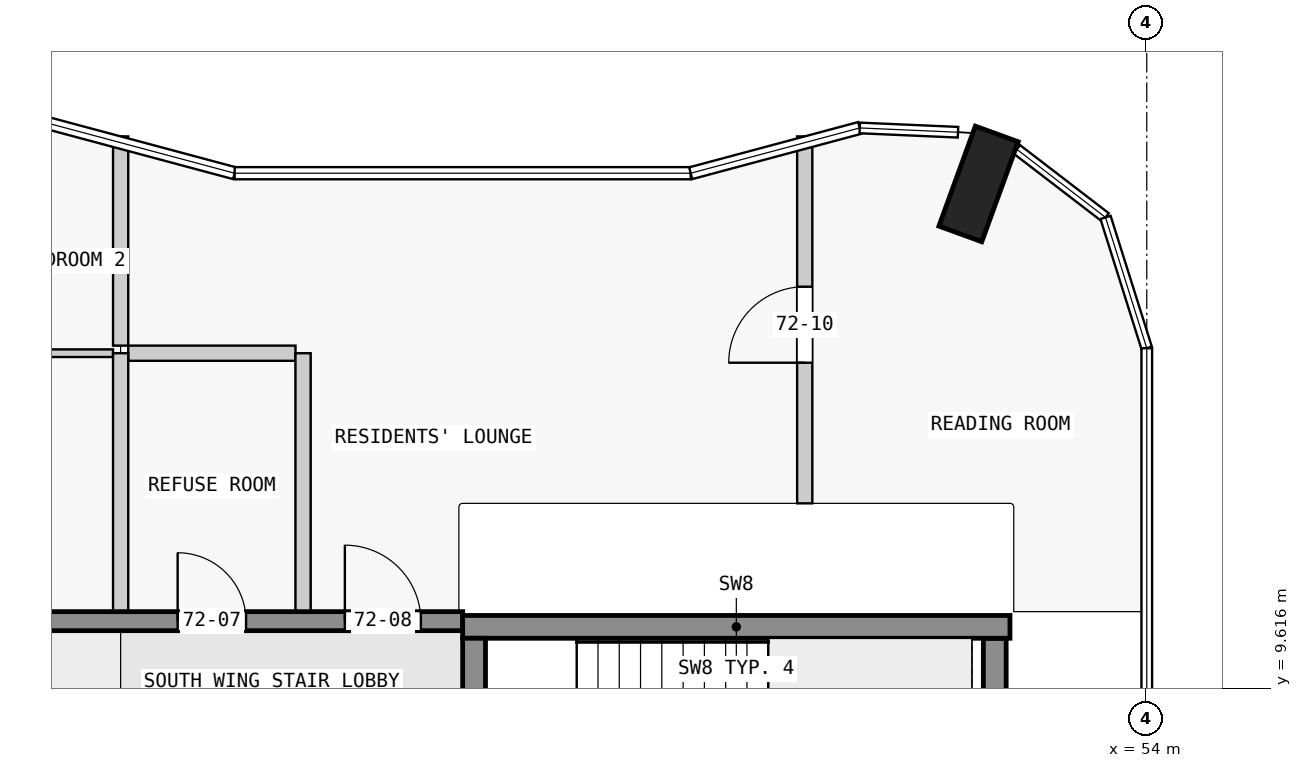
"""IFC4 building model, lengths in metres.
Left out: names, types, materials, properties, quantities, classifications, styles, units other than length and angle.
Written with IfcOpenShell. Run it as: python <this file> out.ifc"""

import sys

from ifc_helpers import new_model, si_unit, direction, frame, frame_2d, origin, origin_2d, place, context, subcontext, project, spatial, rectangle, extrude, element, fill, save


model = new_model("IFC4")
c1 = context("Model", 3, precision=1e-05, world=origin(), true_north=direction((0.0, 1.0)))
c2 = subcontext(c1, "Body", "Model", "MODEL_VIEW")
j1 = project(units=[si_unit("LENGTHUNIT", "METRE"), si_unit("PLANEANGLEUNIT", "RADIAN")], contexts=[c1])
p1 = place(None, origin())
s1 = spatial("IfcSite", under=j1, at=p1, CompositionType="ELEMENT")
p2 = place(p1, origin())
s2 = spatial("IfcBuilding", under=s1, at=p2, CompositionType="ELEMENT")
p3 = place(p2, frame((0.0, 0.0, 273.9)))
s3 = spatial("IfcBuildingStorey", under=s2, at=p3, CompositionType="ELEMENT", Elevation=273.9)
p4 = place(p3, frame((51.787, 16.252, 0.0), z_axis=(0.0, 0.0, 1.0), x_axis=(-0.939664280925, 0.342097996418, 0.0)))
e1 = element("IfcColumn", 1, at=p4, inside=s3, PredefinedType="COLUMN", context=c2, shape_type="SweptSolid", body=[
    extrude(rectangle(XDim=0.6, YDim=1.4, at=origin_2d()), origin(), (0.0, 0.0, 1.0), 3.5),
])
p5 = place(p3, frame((45.15, 7.725, 0.0), z_axis=(0.0, 0.0, 1.0), x_axis=(0.0, 1.0, 0.0)))
e2 = element("IfcWall", 2, at=p5, inside=s3, PredefinedType="SHEAR", context=c2, shape_type="SweptSolid", body=[
    extrude(rectangle(XDim=2.55, YDim=0.3, at=frame_2d((1.275, 0.0))), origin(), (0.0, 0.0, 1.0), 3.5),
])
p6 = place(p5, frame((0.725, 0.0, 0.0)))
e3 = element("IfcOpeningElement", 3, at=p6, cuts=e2, PredefinedType="OPENING", context=c2, shape_type="SweptSolid", body=[
    extrude(rectangle(XDim=1.1, YDim=2.1, at=frame_2d((0.55, 1.05))), frame((0.0, 0.16, 0.0), z_axis=(0.0, -1.0, 0.0), x_axis=(1.0, 0.0, 0.0)), (0.0, 0.0, 1.0), 0.32),
])
p7 = place(p3, frame((52.0, 7.725, 0.0), z_axis=(0.0, 0.0, 1.0), x_axis=(0.0, 1.0, 0.0)))
e4 = element("IfcWall", 4, at=p7, inside=s3, PredefinedType="SHEAR", context=c2, shape_type="SweptSolid", body=[
    extrude(rectangle(XDim=2.55, YDim=0.3, at=frame_2d((1.275, 0.0))), origin(), (0.0, 0.0, 1.0), 3.5),
])
p8 = place(p3, frame((45.0, 10.425, 0.0), z_axis=(0.0, 0.0, 1.0), x_axis=(1.0, 0.0, 0.0)))
e5 = element("IfcWall", 5, at=p8, inside=s3, PredefinedType="SHEAR", context=c2, shape_type="SweptSolid", body=[
    extrude(rectangle(XDim=7.2, YDim=0.3, at=frame_2d((3.6, 0.0))), origin(), (0.0, 0.0, 1.0), 3.5),
])
p9 = place(p3, frame((22.5, 10.5, 0.0), z_axis=(0.0, 0.0, 1.0), x_axis=(1.0, 0.0, 0.0)))
e6 = element("IfcWall", 6, at=p9, inside=s3, PredefinedType="SHEAR", context=c2, shape_type="SweptSolid", body=[
    extrude(rectangle(XDim=22.5, YDim=0.25, at=frame_2d((11.25, 0.0))), origin(), (0.0, 0.0, 1.0), 3.25),
])
p10 = place(p9, frame((1.85, 0.0, 0.0)))
e7 = element("IfcOpeningElement", 7, at=p10, cuts=e6, PredefinedType="OPENING", context=c2, shape_type="SweptSolid", body=[
    extrude(rectangle(XDim=0.9, YDim=2.1, at=frame_2d((0.45, 1.05))), frame((0.0, 0.135, 0.0), z_axis=(0.0, -1.0, 0.0), x_axis=(1.0, 0.0, 0.0)), (0.0, 0.0, 1.0), 0.27),
])
p11 = place(p9, frame((10.05, 0.0, 0.0)))
e8 = element("IfcOpeningElement", 8, at=p11, cuts=e6, PredefinedType="OPENING", context=c2, shape_type="SweptSolid", body=[
    extrude(rectangle(XDim=1.0, YDim=2.1, at=frame_2d((0.5, 1.05))), frame((0.0, 0.135, 0.0), z_axis=(0.0, -1.0, 0.0), x_axis=(1.0, 0.0, 0.0)), (0.0, 0.0, 1.0), 0.27),
])
p12 = place(p9, frame((18.75, 0.0, 0.0)))
e9 = element("IfcOpeningElement", 9, at=p12, cuts=e6, PredefinedType="OPENING", context=c2, shape_type="SweptSolid", body=[
    extrude(rectangle(XDim=0.9, YDim=2.1, at=frame_2d((0.45, 1.05))), frame((0.0, 0.135, 0.0), z_axis=(0.0, -1.0, 0.0), x_axis=(1.0, 0.0, 0.0)), (0.0, 0.0, 1.0), 0.27),
])
p13 = place(p9, frame((20.95, 0.0, 0.0)))
e10 = element("IfcOpeningElement", 10, at=p13, cuts=e6, PredefinedType="OPENING", context=c2, shape_type="SweptSolid", body=[
    extrude(rectangle(XDim=1.0, YDim=2.1, at=frame_2d((0.5, 1.05))), frame((0.0, 0.135, 0.0), z_axis=(0.0, -1.0, 0.0), x_axis=(1.0, 0.0, 0.0)), (0.0, 0.0, 1.0), 0.27),
])
p14 = place(p3, frame((31.5, 14.025, 0.0), z_axis=(0.0, 0.0, 1.0), x_axis=(1.0, 0.0, 0.0)))
e11 = element("IfcWall", 11, at=p14, inside=s3, PredefinedType="PARTITIONING", context=c2, shape_type="SweptSolid", body=[
    extrude(rectangle(XDim=8.9, YDim=0.1, at=frame_2d((4.45, 0.0))), origin(), (0.0, 0.0, 1.0), 3.25),
])
p15 = place(p14, frame((1.85, 0.0, 0.0)))
e12 = element("IfcOpeningElement", 12, at=p15, cuts=e11, PredefinedType="OPENING", context=c2, shape_type="SweptSolid", body=[
    extrude(rectangle(XDim=0.9, YDim=2.1, at=frame_2d((0.45, 1.05))), frame((0.0, 0.06, 0.0), z_axis=(0.0, -1.0, 0.0), x_axis=(1.0, 0.0, 0.0)), (0.0, 0.0, 1.0), 0.12),
])
p16 = place(p14, frame((6.25, 0.0, 0.0)))
e13 = element("IfcOpeningElement", 13, at=p16, cuts=e11, PredefinedType="OPENING", context=c2, shape_type="SweptSolid", body=[
    extrude(rectangle(XDim=0.9, YDim=2.1, at=frame_2d((0.45, 1.05))), frame((0.0, 0.06, 0.0), z_axis=(0.0, -1.0, 0.0), x_axis=(1.0, 0.0, 0.0)), (0.0, 0.0, 1.0), 0.12),
])
p17 = place(p3, frame((42.8, 14.025, 0.0), z_axis=(0.0, 0.0, 1.0), x_axis=(-1.0, 0.0, 0.0)))
e14 = element("IfcWall", 14, at=p17, inside=s3, PredefinedType="PARTITIONING", context=c2, shape_type="SweptSolid", body=[
    extrude(rectangle(XDim=2.2, YDim=0.2, at=frame_2d((1.1, 0.0))), origin(), (0.0, 0.0, 1.0), 3.25),
])
p18 = place(p3, frame((40.5, 14.025, 0.0), z_axis=(0.0, 0.0, 1.0), x_axis=(0.0, -1.0, 0.0)))
e15 = element("IfcWall", 15, at=p18, inside=s3, PredefinedType="PARTITIONING", context=c2, shape_type="SweptSolid", body=[
    extrude(rectangle(XDim=3.4, YDim=0.2, at=frame_2d((1.7, 0.0))), origin(), (0.0, 0.0, 1.0), 3.25),
])
p19 = place(p3, frame((40.5, 14.125, 0.0), z_axis=(0.0, 0.0, 1.0), x_axis=(0.0, 1.0, 0.0)))
e16 = element("IfcWall", 16, at=p19, inside=s3, PredefinedType="PARTITIONING", context=c2, shape_type="SweptSolid", body=[
    extrude(rectangle(XDim=2.753, YDim=0.2, at=frame_2d((1.376, 0.0))), origin(), (0.0, 0.0, 1.0), 3.25),
])
p20 = place(p3, frame((42.9, 10.625, 0.0), z_axis=(0.0, 0.0, 1.0), x_axis=(0.0, 1.0, 0.0)))
e17 = element("IfcWall", 17, at=p20, inside=s3, PredefinedType="PARTITIONING", context=c2, shape_type="SweptSolid", body=[
    extrude(rectangle(XDim=3.4, YDim=0.2, at=frame_2d((1.7, 0.0))), origin(), (0.0, 0.0, 1.0), 3.25),
])
p21 = place(p3, frame((49.5, 12.05, 0.0), z_axis=(0.0, 0.0, 1.0), x_axis=(0.0, 1.0, 0.0)))
e18 = element("IfcWall", 18, at=p21, inside=s3, PredefinedType="PARTITIONING", context=c2, shape_type="SweptSolid", body=[
    extrude(rectangle(XDim=4.828, YDim=0.2, at=frame_2d((2.414, 0.0))), origin(), (0.0, 0.0, 1.0), 3.25),
])
p22 = place(p21, frame((1.85, 0.0, 0.0)))
e19 = element("IfcOpeningElement", 19, at=p22, cuts=e18, PredefinedType="OPENING", context=c2, shape_type="SweptSolid", body=[
    extrude(rectangle(XDim=1.0, YDim=2.1, at=frame_2d((0.5, 1.05))), frame((0.0, 0.11, 0.0), z_axis=(0.0, -1.0, 0.0), x_axis=(1.0, 0.0, 0.0)), (0.0, 0.0, 1.0), 0.22),
])
p23 = place(p12, origin())
e20 = element("IfcDoor", 20, at=p23, inside=s3, OperationType="SINGLE_SWING_RIGHT", PredefinedType="DOOR", context=c2, shape_type="SweptSolid", body=[
    extrude(rectangle(XDim=0.9, YDim=2.1, at=frame_2d((0.45, 1.05))), frame((0.0, 0.025, 0.0), z_axis=(0.0, -1.0, 0.0), x_axis=(1.0, 0.0, 0.0)), (0.0, 0.0, 1.0), 0.05),
])
fill(e9, e20)
p24 = place(p13, origin())
e21 = element("IfcDoor", 21, at=p24, inside=s3, OperationType="SINGLE_SWING_RIGHT", PredefinedType="DOOR", context=c2, shape_type="SweptSolid", body=[
    extrude(rectangle(XDim=1.0, YDim=2.1, at=frame_2d((0.5, 1.05))), frame((0.0, 0.025, 0.0), z_axis=(0.0, -1.0, 0.0), x_axis=(1.0, 0.0, 0.0)), (0.0, 0.0, 1.0), 0.05),
])
fill(e10, e21)
p25 = place(p22, origin())
e22 = element("IfcDoor", 22, at=p25, inside=s3, OperationType="SINGLE_SWING_LEFT", PredefinedType="DOOR", context=c2, shape_type="SweptSolid", body=[
    extrude(rectangle(XDim=1.0, YDim=2.1, at=frame_2d((0.5, 1.05))), frame((0.0, 0.025, 0.0), z_axis=(0.0, -1.0, 0.0), x_axis=(1.0, 0.0, 0.0)), (0.0, 0.0, 1.0), 0.05),
])
fill(e19, e22)
save(model, sys.argv[1])
